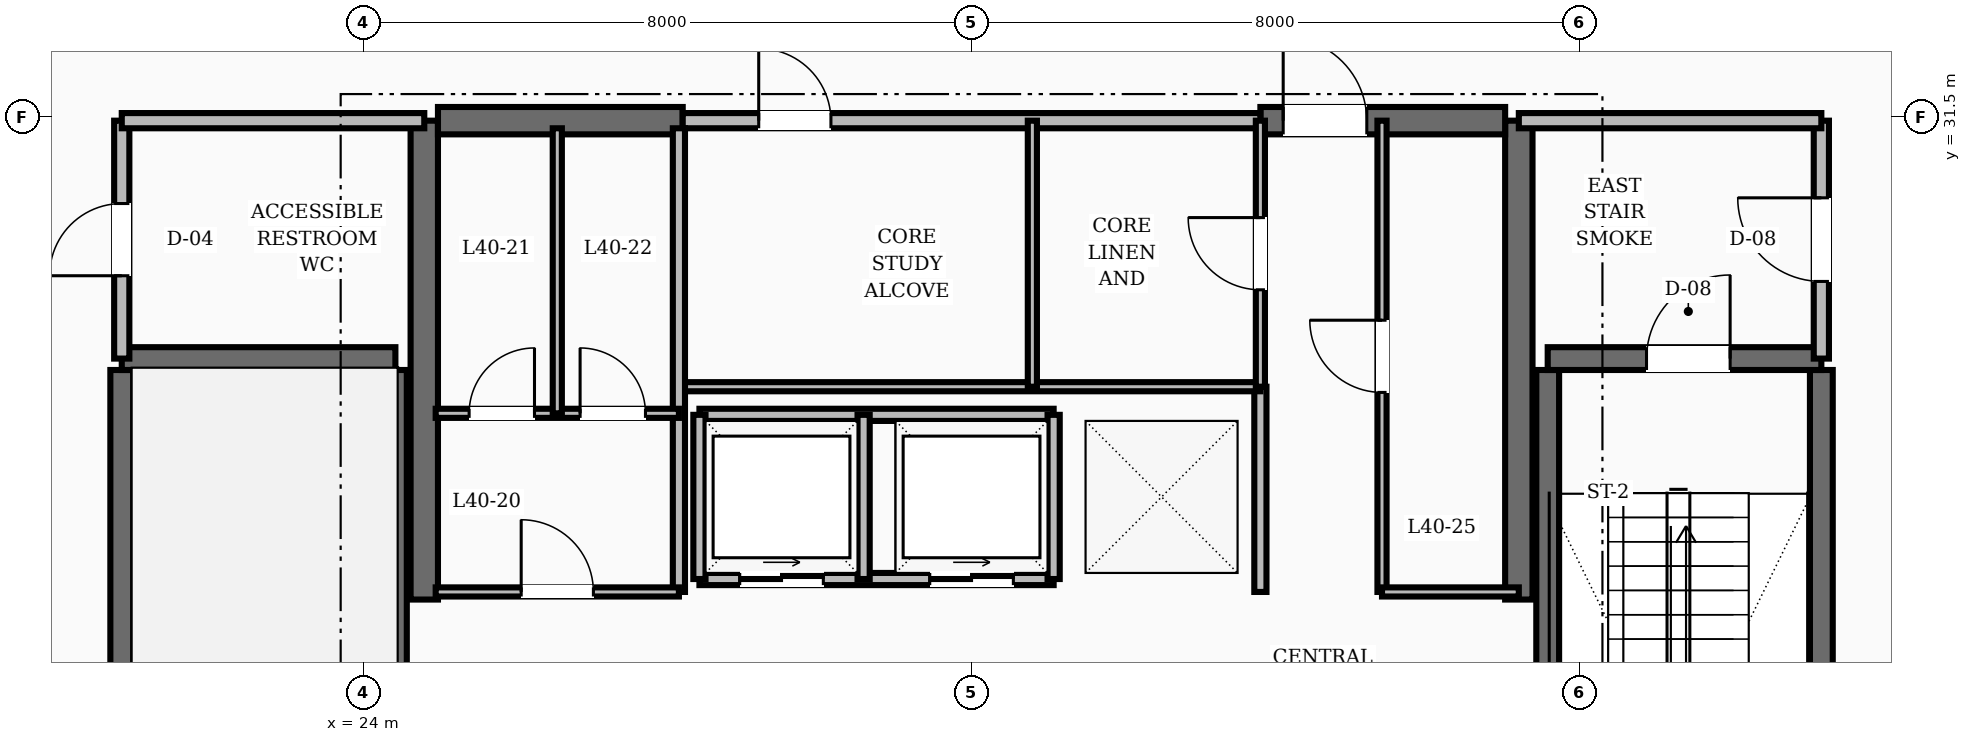
"""IFC4 building model, lengths in metres.
Left out: names, types, materials, properties, quantities, classifications, styles, units other than length and angle.
Written with IfcOpenShell. Run it as: python <this file> out.ifc"""

import sys

from ifc_helpers import new_model, si_unit, direction, frame, frame_2d, origin, place, context, subcontext, project, spatial, rectangle, extrude, element, fill, save


model = new_model("IFC4")
c1 = context("Model", 3, precision=1e-05, world=origin(), true_north=direction((0.0, 1.0)))
c2 = subcontext(c1, "Body", "Model", "MODEL_VIEW")
j1 = project(units=[si_unit("LENGTHUNIT", "METRE"), si_unit("PLANEANGLEUNIT", "RADIAN")], contexts=[c1])
p1 = place(None, origin())
s1 = spatial("IfcSite", under=j1, at=p1, CompositionType="ELEMENT")
p2 = place(p1, origin())
s2 = spatial("IfcBuilding", under=s1, at=p2, CompositionType="ELEMENT")
p3 = place(p2, frame((0.0, 0.0, 156.8)))
s3 = spatial("IfcBuildingStorey", under=s2, at=p3, CompositionType="ELEMENT", Elevation=156.8)
for number, where, z_axis, x_axis in (
    (1, (24.8, 25.15, 0.0), (0.0, 0.0, 1.0), (0.0, 1.0, 0.0)),
    (2, (39.2, 25.15, 0.0), (0.0, 0.0, 1.0), (0.0, 1.0, 0.0)),
):
    element("IfcWall", number, at=place(p3, frame(where, z_axis=z_axis, x_axis=x_axis)), inside=s3, PredefinedType="SHEAR", context=c2, shape_type="SweptSolid", body=[
        extrude(rectangle(XDim=6.3, YDim=0.36, at=frame_2d((3.15, 0.0))), origin(), (0.0, 0.0, 1.0), 3.6),
    ])
p4 = place(p3, frame((24.98, 31.45, 0.0), z_axis=(0.0, 0.0, 1.0), x_axis=(1.0, 0.0, 0.0)))
e3 = element("IfcWall", 3, at=p4, inside=s3, PredefinedType="SHEAR", context=c2, shape_type="SweptSolid", body=[
    extrude(rectangle(XDim=3.22, YDim=0.36, at=frame_2d((1.61, 0.0))), origin(), (0.0, 0.0, 1.0), 3.6),
])
p5 = place(p3, frame((35.8, 31.45, 0.0), z_axis=(0.0, 0.0, 1.0), x_axis=(1.0, 0.0, 0.0)))
e4 = element("IfcWall", 4, at=p5, inside=s3, PredefinedType="SHEAR", context=c2, shape_type="SweptSolid", body=[
    extrude(rectangle(XDim=3.22, YDim=0.36, at=frame_2d((1.61, 0.0))), origin(), (0.0, 0.0, 1.0), 3.6),
])
p6 = place(p5, frame((0.3, 0.0, 0.0)))
e5 = element("IfcOpeningElement", 5, at=p6, cuts=e4, PredefinedType="OPENING", context=c2, shape_type="SweptSolid", body=[
    extrude(rectangle(XDim=1.1, YDim=2.1, at=frame_2d((0.55, 1.05))), frame((0.0, 0.19, 0.0), z_axis=(0.0, -1.0, 0.0), x_axis=(1.0, 0.0, 0.0)), (0.0, 0.0, 1.0), 0.38),
])
for number, where, z_axis, x_axis in (
    (6, (20.82, 19.43, 0.0), (0.0, 0.0, 1.0), (0.0, 1.0, 0.0)),
    (7, (24.42, 19.43, 0.0), (0.0, 0.0, 1.0), (0.0, 1.0, 0.0)),
):
    element("IfcWall", number, at=place(p3, frame(where, z_axis=z_axis, x_axis=x_axis)), inside=s3, PredefinedType="SHEAR", context=c2, shape_type="SweptSolid", body=[
        extrude(rectangle(XDim=8.74, YDim=0.3, at=frame_2d((4.37, 0.0))), origin(), (0.0, 0.0, 1.0), 3.6),
    ])
p7 = place(p3, frame((20.82, 28.32, 0.0), z_axis=(0.0, 0.0, 1.0), x_axis=(1.0, 0.0, 0.0)))
e8 = element("IfcWall", 8, at=p7, inside=s3, PredefinedType="SHEAR", context=c2, shape_type="SweptSolid", body=[
    extrude(rectangle(XDim=3.6, YDim=0.3, at=frame_2d((1.8, 0.0))), origin(), (0.0, 0.0, 1.0), 3.6),
])
for number, where, z_axis, x_axis in (
    (9, (43.18, 19.43, 0.0), (0.0, 0.0, 1.0), (0.0, 1.0, 0.0)),
    (10, (39.58, 19.43, 0.0), (0.0, 0.0, 1.0), (0.0, 1.0, 0.0)),
):
    element("IfcWall", number, at=place(p3, frame(where, z_axis=z_axis, x_axis=x_axis)), inside=s3, PredefinedType="SHEAR", context=c2, shape_type="SweptSolid", body=[
        extrude(rectangle(XDim=8.74, YDim=0.3, at=frame_2d((4.37, 0.0))), origin(), (0.0, 0.0, 1.0), 3.6),
    ])
p8 = place(p3, frame((39.58, 28.32, 0.0), z_axis=(0.0, 0.0, 1.0), x_axis=(1.0, 0.0, 0.0)))
e11 = element("IfcWall", 11, at=p8, inside=s3, PredefinedType="SHEAR", context=c2, shape_type="SweptSolid", body=[
    extrude(rectangle(XDim=3.6, YDim=0.3, at=frame_2d((1.8, 0.0))), origin(), (0.0, 0.0, 1.0), 3.6),
])
p9 = place(p8, frame((1.3, 0.0, 0.0)))
e12 = element("IfcOpeningElement", 12, at=p9, cuts=e11, PredefinedType="OPENING", context=c2, shape_type="SweptSolid", body=[
    extrude(rectangle(XDim=1.1, YDim=2.1, at=frame_2d((0.55, 1.05))), frame((0.0, 0.16, 0.0), z_axis=(0.0, -1.0, 0.0), x_axis=(1.0, 0.0, 0.0)), (0.0, 0.0, 1.0), 0.32),
])
p10 = place(p3, frame((43.18, 28.32, 0.0), z_axis=(0.0, 0.0, 1.0), x_axis=(0.0, 1.0, 0.0)))
e13 = element("IfcWall", 13, at=p10, inside=s3, PredefinedType="SOLIDWALL", context=c2, shape_type="SweptSolid", body=[
    extrude(rectangle(XDim=3.13, YDim=0.2, at=frame_2d((1.565, 0.0))), origin(), (0.0, 0.0, 1.0), 2.8),
])
p11 = place(p10, frame((1.015, 0.0, 0.0)))
e14 = element("IfcOpeningElement", 14, at=p11, cuts=e13, PredefinedType="OPENING", context=c2, shape_type="SweptSolid", body=[
    extrude(rectangle(XDim=1.1, YDim=2.1, at=frame_2d((0.55, 1.05))), frame((0.0, 0.11, 0.0), z_axis=(0.0, -1.0, 0.0), x_axis=(1.0, 0.0, 0.0)), (0.0, 0.0, 1.0), 0.22),
])
p12 = place(p3, frame((39.2, 31.45, 0.0), z_axis=(0.0, 0.0, 1.0), x_axis=(1.0, 0.0, 0.0)))
e15 = element("IfcWall", 15, at=p12, inside=s3, PredefinedType="SOLIDWALL", context=c2, shape_type="SweptSolid", body=[
    extrude(rectangle(XDim=3.98, YDim=0.2, at=frame_2d((1.99, 0.0))), origin(), (0.0, 0.0, 1.0), 2.8),
])
p13 = place(p3, frame((20.82, 28.32, 0.0), z_axis=(0.0, 0.0, 1.0), x_axis=(0.0, 1.0, 0.0)))
e16 = element("IfcWall", 16, at=p13, inside=s3, PredefinedType="SOLIDWALL", context=c2, shape_type="SweptSolid", body=[
    extrude(rectangle(XDim=3.13, YDim=0.2, at=frame_2d((1.565, 0.0))), origin(), (0.0, 0.0, 1.0), 2.8),
])
p14 = place(p13, frame((1.09, 0.0, 0.0)))
e17 = element("IfcOpeningElement", 17, at=p14, cuts=e16, PredefinedType="OPENING", context=c2, shape_type="SweptSolid", body=[
    extrude(rectangle(XDim=0.95, YDim=2.1, at=frame_2d((0.475, 1.05))), frame((0.0, 0.11, 0.0), z_axis=(0.0, -1.0, 0.0), x_axis=(1.0, 0.0, 0.0)), (0.0, 0.0, 1.0), 0.22),
])
p15 = place(p3, frame((20.82, 31.45, 0.0), z_axis=(0.0, 0.0, 1.0), x_axis=(1.0, 0.0, 0.0)))
e18 = element("IfcWall", 18, at=p15, inside=s3, PredefinedType="SOLIDWALL", context=c2, shape_type="SweptSolid", body=[
    extrude(rectangle(XDim=3.98, YDim=0.2, at=frame_2d((1.99, 0.0))), origin(), (0.0, 0.0, 1.0), 2.8),
])
p16 = place(p3, frame((35.8, 25.25, 0.0), z_axis=(0.0, 0.0, 1.0), x_axis=(0.0, 1.0, 0.0)))
e19 = element("IfcWall", 19, at=p16, inside=s3, PredefinedType="SOLIDWALL", context=c2, shape_type="SweptSolid", body=[
    extrude(rectangle(XDim=2.7, YDim=0.16, at=frame_2d((1.35, 0.0))), origin(), (0.0, 0.0, 1.0), 2.8),
])
p17 = place(p3, frame((28.42, 25.42, 0.0), z_axis=(0.0, 0.0, 1.0), x_axis=(1.0, 0.0, 0.0)))
e20 = element("IfcWall", 20, at=p17, inside=s3, PredefinedType="SOLIDWALL", context=c2, shape_type="SweptSolid", body=[
    extrude(rectangle(XDim=4.66, YDim=0.16, at=frame_2d((2.33, 0.0))), origin(), (0.0, 0.0, 1.0), 2.8),
])
p18 = place(p17, frame((0.53, 0.0, 0.0)))
e21 = element("IfcOpeningElement", 21, at=p18, cuts=e20, PredefinedType="OPENING", context=c2, shape_type="SweptSolid", body=[
    extrude(rectangle(XDim=1.1, YDim=2.15, at=frame_2d((0.55, 1.075))), frame((0.0, 0.09, 0.0), z_axis=(0.0, -1.0, 0.0), x_axis=(1.0, 0.0, 0.0)), (0.0, 0.0, 1.0), 0.18),
])
p19 = place(p17, frame((3.03, 0.0, 0.0)))
e22 = element("IfcOpeningElement", 22, at=p19, cuts=e20, PredefinedType="OPENING", context=c2, shape_type="SweptSolid", body=[
    extrude(rectangle(XDim=1.1, YDim=2.15, at=frame_2d((0.55, 1.075))), frame((0.0, 0.09, 0.0), z_axis=(0.0, -1.0, 0.0), x_axis=(1.0, 0.0, 0.0)), (0.0, 0.0, 1.0), 0.18),
])
p20 = place(p3, frame((28.42, 27.58, 0.0), z_axis=(0.0, 0.0, 1.0), x_axis=(1.0, 0.0, 0.0)))
e23 = element("IfcWall", 23, at=p20, inside=s3, PredefinedType="SOLIDWALL", context=c2, shape_type="SweptSolid", body=[
    extrude(rectangle(XDim=4.66, YDim=0.16, at=frame_2d((2.33, 0.0))), origin(), (0.0, 0.0, 1.0), 2.8),
])
for number, where, z_axis, x_axis in (
    (24, (28.42, 25.42, 0.0), (0.0, 0.0, 1.0), (0.0, 1.0, 0.0)),
    (25, (30.58, 25.42, 0.0), (0.0, 0.0, 1.0), (0.0, 1.0, 0.0)),
    (26, (33.08, 25.42, 0.0), (0.0, 0.0, 1.0), (0.0, 1.0, 0.0)),
):
    element("IfcWall", number, at=place(p3, frame(where, z_axis=z_axis, x_axis=x_axis)), inside=s3, PredefinedType="SOLIDWALL", context=c2, shape_type="SweptSolid", body=[
        extrude(rectangle(XDim=2.16, YDim=0.16, at=frame_2d((1.08, 0.0))), origin(), (0.0, 0.0, 1.0), 2.8),
    ])
p21 = place(p3, frame((28.2, 31.45, 0.0), z_axis=(0.0, 0.0, 1.0), x_axis=(1.0, 0.0, 0.0)))
e27 = element("IfcWall", 27, at=p21, inside=s3, PredefinedType="SOLIDWALL", context=c2, shape_type="SweptSolid", body=[
    extrude(rectangle(XDim=7.6, YDim=0.2, at=frame_2d((3.8, 0.0))), origin(), (0.0, 0.0, 1.0), 2.8),
])
p22 = place(p21, frame((1.0, 0.0, 0.0)))
e28 = element("IfcOpeningElement", 28, at=p22, cuts=e27, PredefinedType="OPENING", context=c2, shape_type="SweptSolid", body=[
    extrude(rectangle(XDim=0.95, YDim=2.1, at=frame_2d((0.475, 1.05))), frame((0.0, 0.11, 0.0), z_axis=(0.0, -1.0, 0.0), x_axis=(1.0, 0.0, 0.0)), (0.0, 0.0, 1.0), 0.22),
])
p23 = place(p3, frame((28.2, 27.95, 0.0), z_axis=(0.0, 0.0, 1.0), x_axis=(1.0, 0.0, 0.0)))
e29 = element("IfcWall", 29, at=p23, inside=s3, PredefinedType="PARTITIONING", context=c2, shape_type="SweptSolid", body=[
    extrude(rectangle(XDim=7.6, YDim=0.12, at=frame_2d((3.8, 0.0))), origin(), (0.0, 0.0, 1.0), 2.8),
])
p24 = place(p3, frame((35.8, 27.95, 0.0), z_axis=(0.0, 0.0, 1.0), x_axis=(0.0, 1.0, 0.0)))
e30 = element("IfcWall", 30, at=p24, inside=s3, PredefinedType="PARTITIONING", context=c2, shape_type="SweptSolid", body=[
    extrude(rectangle(XDim=3.5, YDim=0.12, at=frame_2d((1.75, 0.0))), origin(), (0.0, 0.0, 1.0), 2.8),
])
p25 = place(p24, frame((1.275, 0.0, 0.0)))
e31 = element("IfcOpeningElement", 31, at=p25, cuts=e30, PredefinedType="OPENING", context=c2, shape_type="SweptSolid", body=[
    extrude(rectangle(XDim=0.95, YDim=2.1, at=frame_2d((0.475, 1.05))), frame((0.0, 0.07, 0.0), z_axis=(0.0, -1.0, 0.0), x_axis=(1.0, 0.0, 0.0)), (0.0, 0.0, 1.0), 0.14),
])
p26 = place(p3, frame((32.8, 27.95, 0.0), z_axis=(0.0, 0.0, 1.0), x_axis=(0.0, 1.0, 0.0)))
e32 = element("IfcWall", 32, at=p26, inside=s3, PredefinedType="PARTITIONING", context=c2, shape_type="SweptSolid", body=[
    extrude(rectangle(XDim=3.5, YDim=0.12, at=frame_2d((1.75, 0.0))), origin(), (0.0, 0.0, 1.0), 2.8),
])
p27 = place(p3, frame((28.15, 25.25, 0.0), z_axis=(0.0, 0.0, 1.0), x_axis=(0.0, 1.0, 0.0)))
e33 = element("IfcWall", 33, at=p27, inside=s3, PredefinedType="SOLIDWALL", context=c2, shape_type="SweptSolid", body=[
    extrude(rectangle(XDim=6.1, YDim=0.16, at=frame_2d((3.05, 0.0))), origin(), (0.0, 0.0, 1.0), 2.8),
])
p28 = place(p3, frame((24.95, 25.25, 0.0), z_axis=(0.0, 0.0, 1.0), x_axis=(1.0, 0.0, 0.0)))
e34 = element("IfcWall", 34, at=p28, inside=s3, PredefinedType="PARTITIONING", context=c2, shape_type="SweptSolid", body=[
    extrude(rectangle(XDim=3.2, YDim=0.12, at=frame_2d((1.6, 0.0))), origin(), (0.0, 0.0, 1.0), 2.8),
])
p29 = place(p28, frame((1.125, 0.0, 0.0)))
e35 = element("IfcOpeningElement", 35, at=p29, cuts=e34, PredefinedType="OPENING", context=c2, shape_type="SweptSolid", body=[
    extrude(rectangle(XDim=0.95, YDim=2.1, at=frame_2d((0.475, 1.05))), frame((0.0, 0.07, 0.0), z_axis=(0.0, -1.0, 0.0), x_axis=(1.0, 0.0, 0.0)), (0.0, 0.0, 1.0), 0.14),
])
p30 = place(p3, frame((37.4, 25.25, 0.0), z_axis=(0.0, 0.0, 1.0), x_axis=(0.0, 1.0, 0.0)))
e36 = element("IfcWall", 36, at=p30, inside=s3, PredefinedType="PARTITIONING", context=c2, shape_type="SweptSolid", body=[
    extrude(rectangle(XDim=6.2, YDim=0.12, at=frame_2d((3.1, 0.0))), origin(), (0.0, 0.0, 1.0), 2.8),
])
p31 = place(p30, frame((2.625, 0.0, 0.0)))
e37 = element("IfcOpeningElement", 37, at=p31, cuts=e36, PredefinedType="OPENING", context=c2, shape_type="SweptSolid", body=[
    extrude(rectangle(XDim=0.95, YDim=2.1, at=frame_2d((0.475, 1.05))), frame((0.0, 0.07, 0.0), z_axis=(0.0, -1.0, 0.0), x_axis=(1.0, 0.0, 0.0)), (0.0, 0.0, 1.0), 0.14),
])
p32 = place(p3, frame((37.4, 25.25, 0.0), z_axis=(0.0, 0.0, 1.0), x_axis=(1.0, 0.0, 0.0)))
e38 = element("IfcWall", 38, at=p32, inside=s3, PredefinedType="PARTITIONING", context=c2, shape_type="SweptSolid", body=[
    extrude(rectangle(XDim=1.8, YDim=0.12, at=frame_2d((0.9, 0.0))), origin(), (0.0, 0.0, 1.0), 2.8),
])
p33 = place(p3, frame((24.95, 27.6, 0.0), z_axis=(0.0, 0.0, 1.0), x_axis=(1.0, 0.0, 0.0)))
e39 = element("IfcWall", 39, at=p33, inside=s3, PredefinedType="PARTITIONING", context=c2, shape_type="SweptSolid", body=[
    extrude(rectangle(XDim=3.2, YDim=0.12, at=frame_2d((1.6, 0.0))), origin(), (0.0, 0.0, 1.0), 2.8),
])
p34 = place(p33, frame((0.44, 0.0, 0.0)))
e40 = element("IfcOpeningElement", 40, at=p34, cuts=e39, PredefinedType="OPENING", context=c2, shape_type="SweptSolid", body=[
    extrude(rectangle(XDim=0.86, YDim=2.1, at=frame_2d((0.43, 1.05))), frame((0.0, 0.07, 0.0), z_axis=(0.0, -1.0, 0.0), x_axis=(1.0, 0.0, 0.0)), (0.0, 0.0, 1.0), 0.14),
])
p35 = place(p33, frame((1.9, 0.0, 0.0)))
e41 = element("IfcOpeningElement", 41, at=p35, cuts=e39, PredefinedType="OPENING", context=c2, shape_type="SweptSolid", body=[
    extrude(rectangle(XDim=0.86, YDim=2.1, at=frame_2d((0.43, 1.05))), frame((0.0, 0.07, 0.0), z_axis=(0.0, -1.0, 0.0), x_axis=(1.0, 0.0, 0.0)), (0.0, 0.0, 1.0), 0.14),
])
p36 = place(p3, frame((26.55, 27.6, 0.0), z_axis=(0.0, 0.0, 1.0), x_axis=(0.0, 1.0, 0.0)))
e42 = element("IfcWall", 42, at=p36, inside=s3, PredefinedType="PARTITIONING", context=c2, shape_type="SweptSolid", body=[
    extrude(rectangle(XDim=3.75, YDim=0.12, at=frame_2d((1.875, 0.0))), origin(), (0.0, 0.0, 1.0), 2.8),
])
p37 = place(p9, origin())
e43 = element("IfcDoor", 43, at=p37, inside=s3, OperationType="SINGLE_SWING_RIGHT", PredefinedType="DOOR", context=c2, shape_type="SweptSolid", body=[
    extrude(rectangle(XDim=1.1, YDim=2.1, at=frame_2d((0.55, 1.05))), frame((0.0, 0.025, 0.0), z_axis=(0.0, -1.0, 0.0), x_axis=(1.0, 0.0, 0.0)), (0.0, 0.0, 1.0), 0.05),
])
fill(e12, e43)
p38 = place(p11, origin())
e44 = element("IfcDoor", 44, at=p38, inside=s3, OperationType="SINGLE_SWING_RIGHT", PredefinedType="DOOR", context=c2, shape_type="SweptSolid", body=[
    extrude(rectangle(XDim=1.1, YDim=2.1, at=frame_2d((0.55, 1.05))), frame((0.0, 0.025, 0.0), z_axis=(0.0, -1.0, 0.0), x_axis=(1.0, 0.0, 0.0)), (0.0, 0.0, 1.0), 0.05),
])
fill(e14, e44)
p39 = place(p14, origin())
e45 = element("IfcDoor", 45, at=p39, inside=s3, OperationType="SINGLE_SWING_LEFT", PredefinedType="DOOR", context=c2, shape_type="SweptSolid", body=[
    extrude(rectangle(XDim=0.95, YDim=2.1, at=frame_2d((0.475, 1.05))), frame((0.0, 0.025, 0.0), z_axis=(0.0, -1.0, 0.0), x_axis=(1.0, 0.0, 0.0)), (0.0, 0.0, 1.0), 0.05),
])
fill(e17, e45)
p40 = place(p6, origin())
e46 = element("IfcDoor", 46, at=p40, inside=s3, OperationType="SINGLE_SWING_LEFT", PredefinedType="DOOR", context=c2, shape_type="SweptSolid", body=[
    extrude(rectangle(XDim=1.1, YDim=2.1, at=frame_2d((0.55, 1.05))), frame((0.0, 0.025, 0.0), z_axis=(0.0, -1.0, 0.0), x_axis=(1.0, 0.0, 0.0)), (0.0, 0.0, 1.0), 0.05),
])
fill(e5, e46)
p41 = place(p18, origin())
e47 = element("IfcDoor", 47, at=p41, inside=s3, OperationType="SLIDING_TO_RIGHT", PredefinedType="DOOR", context=c2, shape_type="SweptSolid", body=[
    extrude(rectangle(XDim=1.1, YDim=2.15, at=frame_2d((0.55, 1.075))), frame((0.0, 0.025, 0.0), z_axis=(0.0, -1.0, 0.0), x_axis=(1.0, 0.0, 0.0)), (0.0, 0.0, 1.0), 0.05),
])
fill(e21, e47)
p42 = place(p19, origin())
e48 = element("IfcDoor", 48, at=p42, inside=s3, OperationType="SLIDING_TO_RIGHT", PredefinedType="DOOR", context=c2, shape_type="SweptSolid", body=[
    extrude(rectangle(XDim=1.1, YDim=2.15, at=frame_2d((0.55, 1.075))), frame((0.0, 0.025, 0.0), z_axis=(0.0, -1.0, 0.0), x_axis=(1.0, 0.0, 0.0)), (0.0, 0.0, 1.0), 0.05),
])
fill(e22, e48)
p43 = place(p22, origin())
e49 = element("IfcDoor", 49, at=p43, inside=s3, OperationType="SINGLE_SWING_LEFT", PredefinedType="DOOR", context=c2, shape_type="SweptSolid", body=[
    extrude(rectangle(XDim=0.95, YDim=2.1, at=frame_2d((0.475, 1.05))), frame((0.0, 0.025, 0.0), z_axis=(0.0, -1.0, 0.0), x_axis=(1.0, 0.0, 0.0)), (0.0, 0.0, 1.0), 0.05),
])
fill(e28, e49)
p44 = place(p25, origin())
e50 = element("IfcDoor", 50, at=p44, inside=s3, OperationType="SINGLE_SWING_RIGHT", PredefinedType="DOOR", context=c2, shape_type="SweptSolid", body=[
    extrude(rectangle(XDim=0.95, YDim=2.1, at=frame_2d((0.475, 1.05))), frame((0.0, 0.025, 0.0), z_axis=(0.0, -1.0, 0.0), x_axis=(1.0, 0.0, 0.0)), (0.0, 0.0, 1.0), 0.05),
])
fill(e31, e50)
p45 = place(p29, origin())
e51 = element("IfcDoor", 51, at=p45, inside=s3, OperationType="SINGLE_SWING_LEFT", PredefinedType="DOOR", context=c2, shape_type="SweptSolid", body=[
    extrude(rectangle(XDim=0.95, YDim=2.1, at=frame_2d((0.475, 1.05))), frame((0.0, 0.025, 0.0), z_axis=(0.0, -1.0, 0.0), x_axis=(1.0, 0.0, 0.0)), (0.0, 0.0, 1.0), 0.05),
])
fill(e35, e51)
p46 = place(p34, origin())
e52 = element("IfcDoor", 52, at=p46, inside=s3, OperationType="SINGLE_SWING_RIGHT", PredefinedType="DOOR", context=c2, shape_type="SweptSolid", body=[
    extrude(rectangle(XDim=0.86, YDim=2.1, at=frame_2d((0.43, 1.05))), frame((0.0, 0.025, 0.0), z_axis=(0.0, -1.0, 0.0), x_axis=(1.0, 0.0, 0.0)), (0.0, 0.0, 1.0), 0.05),
])
fill(e40, e52)
p47 = place(p35, origin())
e53 = element("IfcDoor", 53, at=p47, inside=s3, OperationType="SINGLE_SWING_LEFT", PredefinedType="DOOR", context=c2, shape_type="SweptSolid", body=[
    extrude(rectangle(XDim=0.86, YDim=2.1, at=frame_2d((0.43, 1.05))), frame((0.0, 0.025, 0.0), z_axis=(0.0, -1.0, 0.0), x_axis=(1.0, 0.0, 0.0)), (0.0, 0.0, 1.0), 0.05),
])
fill(e41, e53)
p48 = place(p31, origin())
e54 = element("IfcDoor", 54, at=p48, inside=s3, OperationType="SINGLE_SWING_RIGHT", PredefinedType="DOOR", context=c2, shape_type="SweptSolid", body=[
    extrude(rectangle(XDim=0.95, YDim=2.1, at=frame_2d((0.475, 1.05))), frame((0.0, 0.025, 0.0), z_axis=(0.0, -1.0, 0.0), x_axis=(1.0, 0.0, 0.0)), (0.0, 0.0, 1.0), 0.05),
])
fill(e37, e54)
save(model, sys.argv[1])
